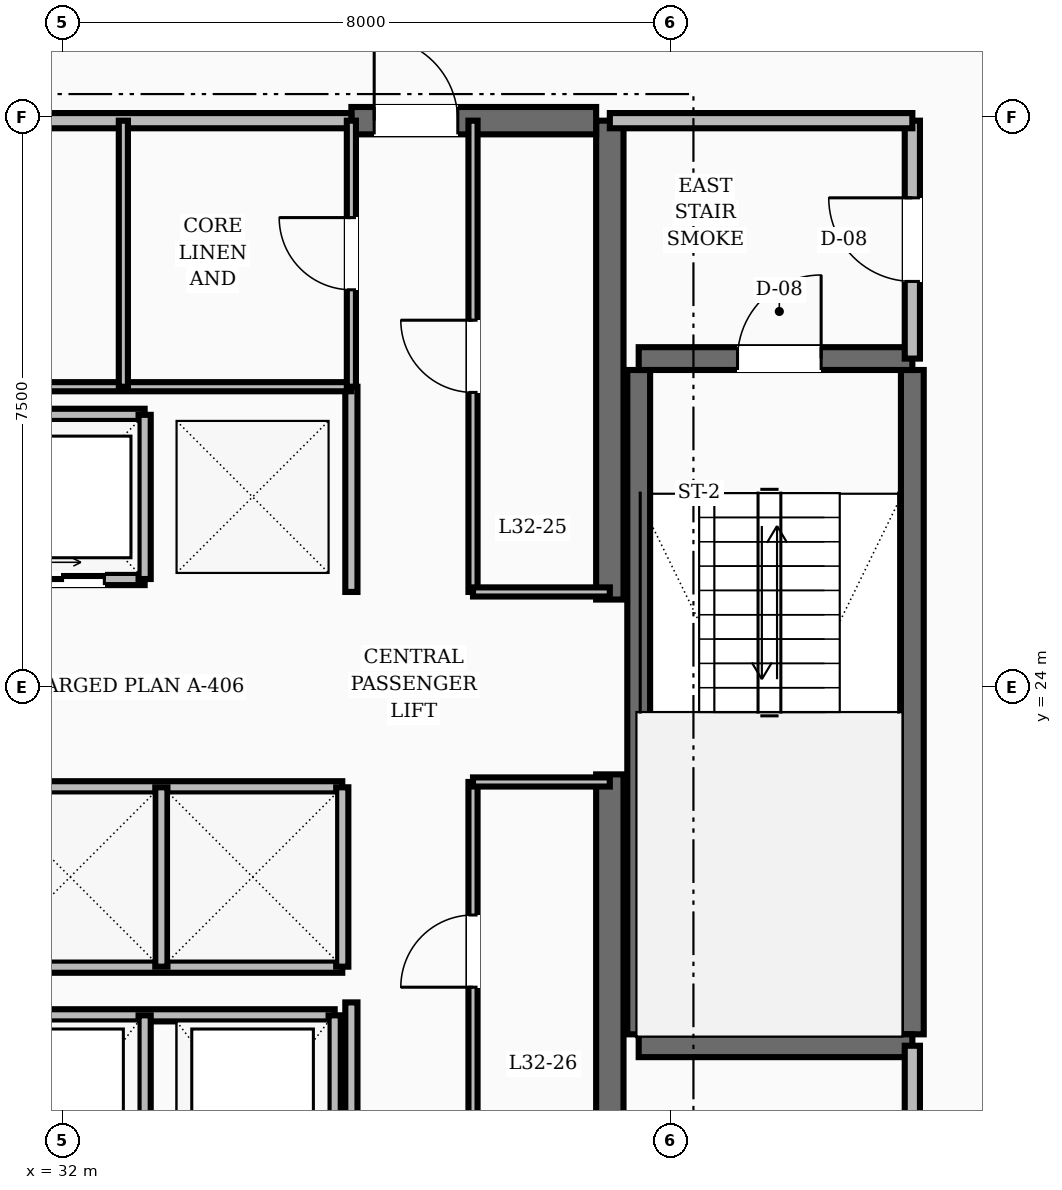
"""IFC4 building model, lengths in metres.
Left out: names, types, materials, properties, quantities, classifications, styles, units other than length and angle.
Written with IfcOpenShell. Run it as: python <this file> out.ifc"""

import sys

from ifc_helpers import new_model, si_unit, direction, frame, frame_2d, origin, place, context, subcontext, project, spatial, rectangle, extrude, element, fill, save


model = new_model("IFC4")
c1 = context("Model", 3, precision=1e-05, world=origin(), true_north=direction((0.0, 1.0)))
c2 = subcontext(c1, "Body", "Model", "MODEL_VIEW")
j1 = project(units=[si_unit("LENGTHUNIT", "METRE"), si_unit("PLANEANGLEUNIT", "RADIAN")], contexts=[c1])
p1 = place(None, origin())
s1 = spatial("IfcSite", under=j1, at=p1, CompositionType="ELEMENT")
p2 = place(p1, origin())
s2 = spatial("IfcBuilding", under=s1, at=p2, CompositionType="ELEMENT")
p3 = place(p2, frame((0.0, 0.0, 128.0)))
s3 = spatial("IfcBuildingStorey", under=s2, at=p3, CompositionType="ELEMENT", Elevation=128.0)
for number, where, z_axis, x_axis in (
    (1, (39.2, 16.55, 0.0), (0.0, 0.0, 1.0), (0.0, 1.0, 0.0)),
    (2, (39.2, 25.15, 0.0), (0.0, 0.0, 1.0), (0.0, 1.0, 0.0)),
):
    element("IfcWall", number, at=place(p3, frame(where, z_axis=z_axis, x_axis=x_axis)), inside=s3, PredefinedType="SHEAR", context=c2, shape_type="SweptSolid", body=[
        extrude(rectangle(XDim=6.3, YDim=0.36, at=frame_2d((3.15, 0.0))), origin(), (0.0, 0.0, 1.0), 3.6),
    ])
p4 = place(p3, frame((35.8, 31.45, 0.0), z_axis=(0.0, 0.0, 1.0), x_axis=(1.0, 0.0, 0.0)))
e3 = element("IfcWall", 3, at=p4, inside=s3, PredefinedType="SHEAR", context=c2, shape_type="SweptSolid", body=[
    extrude(rectangle(XDim=3.22, YDim=0.36, at=frame_2d((1.61, 0.0))), origin(), (0.0, 0.0, 1.0), 3.6),
])
p5 = place(p4, frame((0.3, 0.0, 0.0)))
e4 = element("IfcOpeningElement", 4, at=p5, cuts=e3, PredefinedType="OPENING", context=c2, shape_type="SweptSolid", body=[
    extrude(rectangle(XDim=1.1, YDim=2.1, at=frame_2d((0.55, 1.05))), frame((0.0, 0.19, 0.0), z_axis=(0.0, -1.0, 0.0), x_axis=(1.0, 0.0, 0.0)), (0.0, 0.0, 1.0), 0.38),
])
for number, where, z_axis, x_axis in (
    (5, (43.18, 19.43, 0.0), (0.0, 0.0, 1.0), (0.0, 1.0, 0.0)),
    (6, (39.58, 19.43, 0.0), (0.0, 0.0, 1.0), (0.0, 1.0, 0.0)),
):
    element("IfcWall", number, at=place(p3, frame(where, z_axis=z_axis, x_axis=x_axis)), inside=s3, PredefinedType="SHEAR", context=c2, shape_type="SweptSolid", body=[
        extrude(rectangle(XDim=8.74, YDim=0.3, at=frame_2d((4.37, 0.0))), origin(), (0.0, 0.0, 1.0), 3.6),
    ])
p6 = place(p3, frame((39.58, 19.28, 0.0), z_axis=(0.0, 0.0, 1.0), x_axis=(1.0, 0.0, 0.0)))
e7 = element("IfcWall", 7, at=p6, inside=s3, PredefinedType="SHEAR", context=c2, shape_type="SweptSolid", body=[
    extrude(rectangle(XDim=3.6, YDim=0.3, at=frame_2d((1.8, 0.0))), origin(), (0.0, 0.0, 1.0), 3.6),
])
p7 = place(p3, frame((39.58, 28.32, 0.0), z_axis=(0.0, 0.0, 1.0), x_axis=(1.0, 0.0, 0.0)))
e8 = element("IfcWall", 8, at=p7, inside=s3, PredefinedType="SHEAR", context=c2, shape_type="SweptSolid", body=[
    extrude(rectangle(XDim=3.6, YDim=0.3, at=frame_2d((1.8, 0.0))), origin(), (0.0, 0.0, 1.0), 3.6),
])
p8 = place(p7, frame((1.3, 0.0, 0.0)))
e9 = element("IfcOpeningElement", 9, at=p8, cuts=e8, PredefinedType="OPENING", context=c2, shape_type="SweptSolid", body=[
    extrude(rectangle(XDim=1.1, YDim=2.1, at=frame_2d((0.55, 1.05))), frame((0.0, 0.16, 0.0), z_axis=(0.0, -1.0, 0.0), x_axis=(1.0, 0.0, 0.0)), (0.0, 0.0, 1.0), 0.32),
])
p9 = place(p3, frame((43.18, 28.32, 0.0), z_axis=(0.0, 0.0, 1.0), x_axis=(0.0, 1.0, 0.0)))
e10 = element("IfcWall", 10, at=p9, inside=s3, PredefinedType="SOLIDWALL", context=c2, shape_type="SweptSolid", body=[
    extrude(rectangle(XDim=3.13, YDim=0.2, at=frame_2d((1.565, 0.0))), origin(), (0.0, 0.0, 1.0), 2.8),
])
p10 = place(p9, frame((1.015, 0.0, 0.0)))
e11 = element("IfcOpeningElement", 11, at=p10, cuts=e10, PredefinedType="OPENING", context=c2, shape_type="SweptSolid", body=[
    extrude(rectangle(XDim=1.1, YDim=2.1, at=frame_2d((0.55, 1.05))), frame((0.0, 0.11, 0.0), z_axis=(0.0, -1.0, 0.0), x_axis=(1.0, 0.0, 0.0)), (0.0, 0.0, 1.0), 0.22),
])
p11 = place(p3, frame((39.2, 31.45, 0.0), z_axis=(0.0, 0.0, 1.0), x_axis=(1.0, 0.0, 0.0)))
e12 = element("IfcWall", 12, at=p11, inside=s3, PredefinedType="SOLIDWALL", context=c2, shape_type="SweptSolid", body=[
    extrude(rectangle(XDim=3.98, YDim=0.2, at=frame_2d((1.99, 0.0))), origin(), (0.0, 0.0, 1.0), 2.8),
])
p12 = place(p3, frame((43.18, 16.55, 0.0), z_axis=(0.0, 0.0, 1.0), x_axis=(0.0, 1.0, 0.0)))
e13 = element("IfcWall", 13, at=p12, inside=s3, PredefinedType="SOLIDWALL", context=c2, shape_type="SweptSolid", body=[
    extrude(rectangle(XDim=2.73, YDim=0.2, at=frame_2d((1.365, 0.0))), origin(), (0.0, 0.0, 1.0), 2.8),
])
p13 = place(p12, frame((0.89, 0.0, 0.0)))
e14 = element("IfcOpeningElement", 14, at=p13, cuts=e13, PredefinedType="OPENING", context=c2, shape_type="SweptSolid", body=[
    extrude(rectangle(XDim=0.95, YDim=2.1, at=frame_2d((0.475, 1.05))), frame((0.0, 0.11, 0.0), z_axis=(0.0, -1.0, 0.0), x_axis=(1.0, 0.0, 0.0)), (0.0, 0.0, 1.0), 0.22),
])
p14 = place(p3, frame((35.8, 16.55, 0.0), z_axis=(0.0, 0.0, 1.0), x_axis=(0.0, 1.0, 0.0)))
e15 = element("IfcWall", 15, at=p14, inside=s3, PredefinedType="SOLIDWALL", context=c2, shape_type="SweptSolid", body=[
    extrude(rectangle(XDim=3.3, YDim=0.16, at=frame_2d((1.65, 0.0))), origin(), (0.0, 0.0, 1.0), 2.8),
])
p15 = place(p3, frame((35.8, 25.25, 0.0), z_axis=(0.0, 0.0, 1.0), x_axis=(0.0, 1.0, 0.0)))
e16 = element("IfcWall", 16, at=p15, inside=s3, PredefinedType="SOLIDWALL", context=c2, shape_type="SweptSolid", body=[
    extrude(rectangle(XDim=2.7, YDim=0.16, at=frame_2d((1.35, 0.0))), origin(), (0.0, 0.0, 1.0), 2.8),
])
p16 = place(p3, frame((28.42, 25.42, 0.0), z_axis=(0.0, 0.0, 1.0), x_axis=(1.0, 0.0, 0.0)))
e17 = element("IfcWall", 17, at=p16, inside=s3, PredefinedType="SOLIDWALL", context=c2, shape_type="SweptSolid", body=[
    extrude(rectangle(XDim=4.66, YDim=0.16, at=frame_2d((2.33, 0.0))), origin(), (0.0, 0.0, 1.0), 2.8),
])
p17 = place(p16, frame((0.53, 0.0, 0.0)))
e18 = element("IfcOpeningElement", 18, at=p17, cuts=e17, PredefinedType="OPENING", context=c2, shape_type="SweptSolid", body=[
    extrude(rectangle(XDim=1.1, YDim=2.15, at=frame_2d((0.55, 1.075))), frame((0.0, 0.09, 0.0), z_axis=(0.0, -1.0, 0.0), x_axis=(1.0, 0.0, 0.0)), (0.0, 0.0, 1.0), 0.18),
])
p18 = place(p16, frame((3.03, 0.0, 0.0)))
e19 = element("IfcOpeningElement", 19, at=p18, cuts=e17, PredefinedType="OPENING", context=c2, shape_type="SweptSolid", body=[
    extrude(rectangle(XDim=1.1, YDim=2.15, at=frame_2d((0.55, 1.075))), frame((0.0, 0.09, 0.0), z_axis=(0.0, -1.0, 0.0), x_axis=(1.0, 0.0, 0.0)), (0.0, 0.0, 1.0), 0.18),
])
p19 = place(p3, frame((28.42, 27.58, 0.0), z_axis=(0.0, 0.0, 1.0), x_axis=(1.0, 0.0, 0.0)))
e20 = element("IfcWall", 20, at=p19, inside=s3, PredefinedType="SOLIDWALL", context=c2, shape_type="SweptSolid", body=[
    extrude(rectangle(XDim=4.66, YDim=0.16, at=frame_2d((2.33, 0.0))), origin(), (0.0, 0.0, 1.0), 2.8),
])
p20 = place(p3, frame((33.08, 25.42, 0.0), z_axis=(0.0, 0.0, 1.0), x_axis=(0.0, 1.0, 0.0)))
e21 = element("IfcWall", 21, at=p20, inside=s3, PredefinedType="SOLIDWALL", context=c2, shape_type="SweptSolid", body=[
    extrude(rectangle(XDim=2.16, YDim=0.16, at=frame_2d((1.08, 0.0))), origin(), (0.0, 0.0, 1.0), 2.8),
])
for number, where, z_axis, x_axis in (
    (22, (30.92, 22.68, 0.0), (0.0, 0.0, 1.0), (1.0, 0.0, 0.0)),
    (23, (30.92, 20.32, 0.0), (0.0, 0.0, 1.0), (1.0, 0.0, 0.0)),
):
    element("IfcWall", number, at=place(p3, frame(where, z_axis=z_axis, x_axis=x_axis)), inside=s3, PredefinedType="SOLIDWALL", context=c2, shape_type="SweptSolid", body=[
        extrude(rectangle(XDim=4.76, YDim=0.16, at=frame_2d((2.38, 0.0))), origin(), (0.0, 0.0, 1.0), 2.8),
    ])
for number, where, z_axis, x_axis in (
    (24, (33.3, 20.32, 0.0), (0.0, 0.0, 1.0), (0.0, 1.0, 0.0)),
    (25, (35.68, 20.32, 0.0), (0.0, 0.0, 1.0), (0.0, 1.0, 0.0)),
):
    element("IfcWall", number, at=place(p3, frame(where, z_axis=z_axis, x_axis=x_axis)), inside=s3, PredefinedType="SOLIDWALL", context=c2, shape_type="SweptSolid", body=[
        extrude(rectangle(XDim=2.36, YDim=0.16, at=frame_2d((1.18, 0.0))), origin(), (0.0, 0.0, 1.0), 2.8),
    ])
p21 = place(p3, frame((28.42, 19.68, 0.0), z_axis=(0.0, 0.0, 1.0), x_axis=(1.0, 0.0, 0.0)))
e26 = element("IfcWall", 26, at=p21, inside=s3, PredefinedType="SOLIDWALL", context=c2, shape_type="SweptSolid", body=[
    extrude(rectangle(XDim=7.16, YDim=0.16, at=frame_2d((3.58, 0.0))), origin(), (0.0, 0.0, 1.0), 2.8),
])
for number, where, z_axis, x_axis in (
    (27, (33.08, 16.92, 0.0), (0.0, 0.0, 1.0), (0.0, 1.0, 0.0)),
    (28, (35.58, 16.92, 0.0), (0.0, 0.0, 1.0), (0.0, 1.0, 0.0)),
):
    element("IfcWall", number, at=place(p3, frame(where, z_axis=z_axis, x_axis=x_axis)), inside=s3, PredefinedType="SOLIDWALL", context=c2, shape_type="SweptSolid", body=[
        extrude(rectangle(XDim=2.76, YDim=0.16, at=frame_2d((1.38, 0.0))), origin(), (0.0, 0.0, 1.0), 2.8),
    ])
p22 = place(p3, frame((28.2, 31.45, 0.0), z_axis=(0.0, 0.0, 1.0), x_axis=(1.0, 0.0, 0.0)))
e29 = element("IfcWall", 29, at=p22, inside=s3, PredefinedType="SOLIDWALL", context=c2, shape_type="SweptSolid", body=[
    extrude(rectangle(XDim=7.6, YDim=0.2, at=frame_2d((3.8, 0.0))), origin(), (0.0, 0.0, 1.0), 2.8),
])
p23 = place(p22, frame((1.0, 0.0, 0.0)))
e30 = element("IfcOpeningElement", 30, at=p23, cuts=e29, PredefinedType="OPENING", context=c2, shape_type="SweptSolid", body=[
    extrude(rectangle(XDim=0.95, YDim=2.1, at=frame_2d((0.475, 1.05))), frame((0.0, 0.11, 0.0), z_axis=(0.0, -1.0, 0.0), x_axis=(1.0, 0.0, 0.0)), (0.0, 0.0, 1.0), 0.22),
])
p24 = place(p3, frame((28.2, 27.95, 0.0), z_axis=(0.0, 0.0, 1.0), x_axis=(1.0, 0.0, 0.0)))
e31 = element("IfcWall", 31, at=p24, inside=s3, PredefinedType="PARTITIONING", context=c2, shape_type="SweptSolid", body=[
    extrude(rectangle(XDim=7.6, YDim=0.12, at=frame_2d((3.8, 0.0))), origin(), (0.0, 0.0, 1.0), 2.8),
])
p25 = place(p3, frame((35.8, 27.95, 0.0), z_axis=(0.0, 0.0, 1.0), x_axis=(0.0, 1.0, 0.0)))
e32 = element("IfcWall", 32, at=p25, inside=s3, PredefinedType="PARTITIONING", context=c2, shape_type="SweptSolid", body=[
    extrude(rectangle(XDim=3.5, YDim=0.12, at=frame_2d((1.75, 0.0))), origin(), (0.0, 0.0, 1.0), 2.8),
])
p26 = place(p25, frame((1.275, 0.0, 0.0)))
e33 = element("IfcOpeningElement", 33, at=p26, cuts=e32, PredefinedType="OPENING", context=c2, shape_type="SweptSolid", body=[
    extrude(rectangle(XDim=0.95, YDim=2.1, at=frame_2d((0.475, 1.05))), frame((0.0, 0.07, 0.0), z_axis=(0.0, -1.0, 0.0), x_axis=(1.0, 0.0, 0.0)), (0.0, 0.0, 1.0), 0.14),
])
p27 = place(p3, frame((32.8, 27.95, 0.0), z_axis=(0.0, 0.0, 1.0), x_axis=(0.0, 1.0, 0.0)))
e34 = element("IfcWall", 34, at=p27, inside=s3, PredefinedType="PARTITIONING", context=c2, shape_type="SweptSolid", body=[
    extrude(rectangle(XDim=3.5, YDim=0.12, at=frame_2d((1.75, 0.0))), origin(), (0.0, 0.0, 1.0), 2.8),
])
p28 = place(p3, frame((37.4, 25.25, 0.0), z_axis=(0.0, 0.0, 1.0), x_axis=(0.0, 1.0, 0.0)))
e35 = element("IfcWall", 35, at=p28, inside=s3, PredefinedType="PARTITIONING", context=c2, shape_type="SweptSolid", body=[
    extrude(rectangle(XDim=6.2, YDim=0.12, at=frame_2d((3.1, 0.0))), origin(), (0.0, 0.0, 1.0), 2.8),
])
p29 = place(p28, frame((2.625, 0.0, 0.0)))
e36 = element("IfcOpeningElement", 36, at=p29, cuts=e35, PredefinedType="OPENING", context=c2, shape_type="SweptSolid", body=[
    extrude(rectangle(XDim=0.95, YDim=2.1, at=frame_2d((0.475, 1.05))), frame((0.0, 0.07, 0.0), z_axis=(0.0, -1.0, 0.0), x_axis=(1.0, 0.0, 0.0)), (0.0, 0.0, 1.0), 0.14),
])
p30 = place(p3, frame((37.4, 25.25, 0.0), z_axis=(0.0, 0.0, 1.0), x_axis=(1.0, 0.0, 0.0)))
e37 = element("IfcWall", 37, at=p30, inside=s3, PredefinedType="PARTITIONING", context=c2, shape_type="SweptSolid", body=[
    extrude(rectangle(XDim=1.8, YDim=0.12, at=frame_2d((0.9, 0.0))), origin(), (0.0, 0.0, 1.0), 2.8),
])
p31 = place(p3, frame((37.4, 18.3, 0.0), z_axis=(0.0, 0.0, 1.0), x_axis=(0.0, 1.0, 0.0)))
e38 = element("IfcWall", 38, at=p31, inside=s3, PredefinedType="PARTITIONING", context=c2, shape_type="SweptSolid", body=[
    extrude(rectangle(XDim=4.45, YDim=0.12, at=frame_2d((2.225, 0.0))), origin(), (0.0, 0.0, 1.0), 2.8),
])
p32 = place(p31, frame((1.75, 0.0, 0.0)))
e39 = element("IfcOpeningElement", 39, at=p32, cuts=e38, PredefinedType="OPENING", context=c2, shape_type="SweptSolid", body=[
    extrude(rectangle(XDim=0.95, YDim=2.1, at=frame_2d((0.475, 1.05))), frame((0.0, 0.07, 0.0), z_axis=(0.0, -1.0, 0.0), x_axis=(1.0, 0.0, 0.0)), (0.0, 0.0, 1.0), 0.14),
])
p33 = place(p3, frame((37.4, 22.75, 0.0), z_axis=(0.0, 0.0, 1.0), x_axis=(1.0, 0.0, 0.0)))
e40 = element("IfcWall", 40, at=p33, inside=s3, PredefinedType="PARTITIONING", context=c2, shape_type="SweptSolid", body=[
    extrude(rectangle(XDim=1.8, YDim=0.12, at=frame_2d((0.9, 0.0))), origin(), (0.0, 0.0, 1.0), 2.8),
])
p34 = place(p8, origin())
e41 = element("IfcDoor", 41, at=p34, inside=s3, OperationType="SINGLE_SWING_RIGHT", PredefinedType="DOOR", context=c2, shape_type="SweptSolid", body=[
    extrude(rectangle(XDim=1.1, YDim=2.1, at=frame_2d((0.55, 1.05))), frame((0.0, 0.025, 0.0), z_axis=(0.0, -1.0, 0.0), x_axis=(1.0, 0.0, 0.0)), (0.0, 0.0, 1.0), 0.05),
])
fill(e9, e41)
p35 = place(p10, origin())
e42 = element("IfcDoor", 42, at=p35, inside=s3, OperationType="SINGLE_SWING_RIGHT", PredefinedType="DOOR", context=c2, shape_type="SweptSolid", body=[
    extrude(rectangle(XDim=1.1, YDim=2.1, at=frame_2d((0.55, 1.05))), frame((0.0, 0.025, 0.0), z_axis=(0.0, -1.0, 0.0), x_axis=(1.0, 0.0, 0.0)), (0.0, 0.0, 1.0), 0.05),
])
fill(e11, e42)
p36 = place(p5, origin())
e43 = element("IfcDoor", 43, at=p36, inside=s3, OperationType="SINGLE_SWING_LEFT", PredefinedType="DOOR", context=c2, shape_type="SweptSolid", body=[
    extrude(rectangle(XDim=1.1, YDim=2.1, at=frame_2d((0.55, 1.05))), frame((0.0, 0.025, 0.0), z_axis=(0.0, -1.0, 0.0), x_axis=(1.0, 0.0, 0.0)), (0.0, 0.0, 1.0), 0.05),
])
fill(e4, e43)
p37 = place(p18, origin())
e44 = element("IfcDoor", 44, at=p37, inside=s3, OperationType="SLIDING_TO_RIGHT", PredefinedType="DOOR", context=c2, shape_type="SweptSolid", body=[
    extrude(rectangle(XDim=1.1, YDim=2.15, at=frame_2d((0.55, 1.075))), frame((0.0, 0.025, 0.0), z_axis=(0.0, -1.0, 0.0), x_axis=(1.0, 0.0, 0.0)), (0.0, 0.0, 1.0), 0.05),
])
fill(e19, e44)
p38 = place(p26, origin())
e45 = element("IfcDoor", 45, at=p38, inside=s3, OperationType="SINGLE_SWING_RIGHT", PredefinedType="DOOR", context=c2, shape_type="SweptSolid", body=[
    extrude(rectangle(XDim=0.95, YDim=2.1, at=frame_2d((0.475, 1.05))), frame((0.0, 0.025, 0.0), z_axis=(0.0, -1.0, 0.0), x_axis=(1.0, 0.0, 0.0)), (0.0, 0.0, 1.0), 0.05),
])
fill(e33, e45)
p39 = place(p29, origin())
e46 = element("IfcDoor", 46, at=p39, inside=s3, OperationType="SINGLE_SWING_RIGHT", PredefinedType="DOOR", context=c2, shape_type="SweptSolid", body=[
    extrude(rectangle(XDim=0.95, YDim=2.1, at=frame_2d((0.475, 1.05))), frame((0.0, 0.025, 0.0), z_axis=(0.0, -1.0, 0.0), x_axis=(1.0, 0.0, 0.0)), (0.0, 0.0, 1.0), 0.05),
])
fill(e36, e46)
p40 = place(p32, origin())
e47 = element("IfcDoor", 47, at=p40, inside=s3, OperationType="SINGLE_SWING_LEFT", PredefinedType="DOOR", context=c2, shape_type="SweptSolid", body=[
    extrude(rectangle(XDim=0.95, YDim=2.1, at=frame_2d((0.475, 1.05))), frame((0.0, 0.025, 0.0), z_axis=(0.0, -1.0, 0.0), x_axis=(1.0, 0.0, 0.0)), (0.0, 0.0, 1.0), 0.05),
])
fill(e39, e47)
save(model, sys.argv[1])
